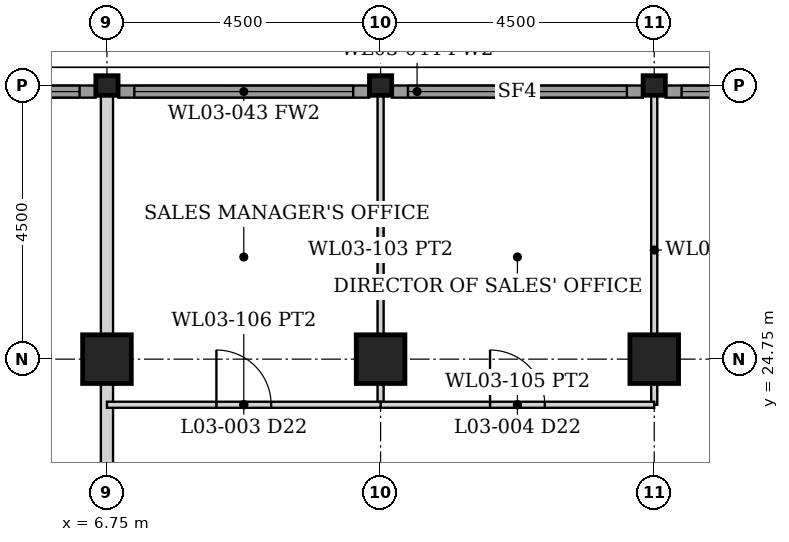
"""IFC4 building model, lengths in metres.
Left out: names, types, materials, properties, quantities, classifications, styles, units other than length and angle.
Written with IfcOpenShell. Run it as: python <this file> out.ifc"""

import sys

from ifc_helpers import new_model, si_unit, direction, frame, frame_2d, origin, origin_2d, place, context, subcontext, project, spatial, rectangle, hollow_rectangle, i_section, extrude, element, fill, save


model = new_model("IFC4")
c1 = context("Model", 3, precision=1e-05, world=origin(), true_north=direction((0.0, 1.0)))
c2 = subcontext(c1, "Body", "Model", "MODEL_VIEW")
j1 = project(units=[si_unit("LENGTHUNIT", "METRE"), si_unit("PLANEANGLEUNIT", "RADIAN")], contexts=[c1])
p1 = place(None, origin())
s1 = spatial("IfcSite", under=j1, at=p1, CompositionType="ELEMENT")
p2 = place(p1, origin())
s2 = spatial("IfcBuilding", under=s1, at=p2, CompositionType="ELEMENT")
p3 = place(p2, frame((0.0, 0.0, 16.0)))
s3 = spatial("IfcBuildingStorey", under=s2, at=p3, CompositionType="ELEMENT", Elevation=16.0)
for number, where, z_axis, x_axis in (
    (1, (6.75, 24.75, 0.0), (0.0, 0.0, 1.0), (0.0, 1.0, 0.0)),
    (2, (11.25, 24.75, 0.0), (0.0, 0.0, 1.0), (0.0, 1.0, 0.0)),
    (3, (15.75, 24.75, 0.0), (0.0, 0.0, 1.0), (0.0, 1.0, 0.0)),
):
    element("IfcColumn", number, at=place(p3, frame(where, z_axis=z_axis, x_axis=x_axis)), inside=s3, PredefinedType="COLUMN", context=c2, shape_type="SweptSolid", body=[
        extrude(hollow_rectangle(XDim=0.8, YDim=0.8, WallThickness=0.08, at=origin_2d()), origin(), (0.0, 0.0, 1.0), 5.5),
    ])
for number, where, z_axis, x_axis in (
    (4, (6.75, 29.25, 0.0), (0.0, 0.0, 1.0), (0.0, 1.0, 0.0)),
    (5, (11.25, 29.25, 0.0), (0.0, 0.0, 1.0), (0.0, 1.0, 0.0)),
    (6, (15.75, 29.25, 0.0), (0.0, 0.0, 1.0), (0.0, 1.0, 0.0)),
):
    element("IfcColumn", number, at=place(p3, frame(where, z_axis=z_axis, x_axis=x_axis)), inside=s3, PredefinedType="COLUMN", context=c2, shape_type="SweptSolid", body=[
        extrude(i_section(OverallWidth=0.322, OverallDepth=0.365, WebThickness=0.027, FlangeThickness=0.044, FilletRadius=0.015, at=origin_2d()), origin(), (0.0, 0.0, 1.0), 5.5),
    ])
p4 = place(p3, frame((2.438, 29.15, 0.0), z_axis=(0.0, 0.0, 1.0), x_axis=(1.0, 0.0, 0.0)))
e7 = element("IfcWall", 7, at=p4, inside=s3, PredefinedType="SOLIDWALL", context=c2, shape_type="SweptSolid", body=[
    extrude(rectangle(XDim=4.125, YDim=0.2, at=frame_2d((2.062, 0.0))), origin(), (0.0, 0.0, 1.0), 4.633),
])
p5 = place(p4, frame((0.262, 0.0, 0.15)))
e8 = element("IfcOpeningElement", 8, at=p5, cuts=e7, PredefinedType="OPENING", context=c2, shape_type="SweptSolid", body=[
    extrude(rectangle(XDim=3.6, YDim=4.333, at=frame_2d((1.8, 2.167))), frame((0.0, 0.11, 0.0), z_axis=(0.0, -1.0, 0.0), x_axis=(1.0, 0.0, 0.0)), (0.0, 0.0, 1.0), 0.22),
])
p6 = place(p3, frame((6.938, 29.15, 0.0), z_axis=(0.0, 0.0, 1.0), x_axis=(1.0, 0.0, 0.0)))
e9 = element("IfcWall", 9, at=p6, inside=s3, PredefinedType="SOLIDWALL", context=c2, shape_type="SweptSolid", body=[
    extrude(rectangle(XDim=4.125, YDim=0.2, at=frame_2d((2.062, 0.0))), origin(), (0.0, 0.0, 1.0), 4.633),
])
p7 = place(p6, frame((0.262, 0.0, 0.15)))
e10 = element("IfcOpeningElement", 10, at=p7, cuts=e9, PredefinedType="OPENING", context=c2, shape_type="SweptSolid", body=[
    extrude(rectangle(XDim=3.6, YDim=4.333, at=frame_2d((1.8, 2.167))), frame((0.0, 0.11, 0.0), z_axis=(0.0, -1.0, 0.0), x_axis=(1.0, 0.0, 0.0)), (0.0, 0.0, 1.0), 0.22),
])
p8 = place(p3, frame((11.438, 29.15, 0.0), z_axis=(0.0, 0.0, 1.0), x_axis=(1.0, 0.0, 0.0)))
e11 = element("IfcWall", 11, at=p8, inside=s3, PredefinedType="SOLIDWALL", context=c2, shape_type="SweptSolid", body=[
    extrude(rectangle(XDim=4.125, YDim=0.2, at=frame_2d((2.062, 0.0))), origin(), (0.0, 0.0, 1.0), 4.633),
])
p9 = place(p8, frame((0.262, 0.0, 0.15)))
e12 = element("IfcOpeningElement", 12, at=p9, cuts=e11, PredefinedType="OPENING", context=c2, shape_type="SweptSolid", body=[
    extrude(rectangle(XDim=3.6, YDim=4.333, at=frame_2d((1.8, 2.167))), frame((0.0, 0.11, 0.0), z_axis=(0.0, -1.0, 0.0), x_axis=(1.0, 0.0, 0.0)), (0.0, 0.0, 1.0), 0.22),
])
p10 = place(p3, frame((15.938, 29.15, 0.0), z_axis=(0.0, 0.0, 1.0), x_axis=(1.0, 0.0, 0.0)))
e13 = element("IfcWall", 13, at=p10, inside=s3, PredefinedType="SOLIDWALL", context=c2, shape_type="SweptSolid", body=[
    extrude(rectangle(XDim=4.125, YDim=0.2, at=frame_2d((2.062, 0.0))), origin(), (0.0, 0.0, 1.0), 4.633),
])
p11 = place(p10, frame((0.262, 0.0, 0.15)))
e14 = element("IfcOpeningElement", 14, at=p11, cuts=e13, PredefinedType="OPENING", context=c2, shape_type="SweptSolid", body=[
    extrude(rectangle(XDim=3.6, YDim=4.333, at=frame_2d((1.8, 2.167))), frame((0.0, 0.11, 0.0), z_axis=(0.0, -1.0, 0.0), x_axis=(1.0, 0.0, 0.0)), (0.0, 0.0, 1.0), 0.22),
])
p12 = place(p3, frame((6.75, 9.2, 0.0), z_axis=(0.0, 0.0, 1.0), x_axis=(0.0, 1.0, 0.0)))
e15 = element("IfcWall", 15, at=p12, inside=s3, PredefinedType="PARTITIONING", context=c2, shape_type="SweptSolid", body=[
    extrude(rectangle(XDim=19.889, YDim=0.2, at=frame_2d((9.944, 0.0))), origin(), (0.0, 0.0, 1.0), 4.329),
])
for number, where, z_axis, x_axis in (
    (16, (11.25, 24.0, 0.0), (0.0, 0.0, 1.0), (0.0, 1.0, 0.0)),
    (17, (15.75, 24.0, 0.0), (0.0, 0.0, 1.0), (0.0, 1.0, 0.0)),
):
    element("IfcWall", number, at=place(p3, frame(where, z_axis=z_axis, x_axis=x_axis)), inside=s3, PredefinedType="PARTITIONING", context=c2, shape_type="SweptSolid", body=[
        extrude(rectangle(XDim=5.089, YDim=0.1, at=frame_2d((2.544, 0.0))), origin(), (0.0, 0.0, 1.0), 4.329),
    ])
p13 = place(p3, frame((11.25, 24.0, 0.0), z_axis=(0.0, 0.0, 1.0), x_axis=(1.0, 0.0, 0.0)))
e18 = element("IfcWall", 18, at=p13, inside=s3, PredefinedType="PARTITIONING", context=c2, shape_type="SweptSolid", body=[
    extrude(rectangle(XDim=4.5, YDim=0.1, at=frame_2d((2.25, 0.0))), origin(), (0.0, 0.0, 1.0), 4.329),
])
p14 = place(p13, frame((1.8, 0.0, 0.0)))
e19 = element("IfcOpeningElement", 19, at=p14, cuts=e18, PredefinedType="OPENING", context=c2, shape_type="SweptSolid", body=[
    extrude(rectangle(XDim=0.9, YDim=2.1, at=frame_2d((0.45, 1.05))), frame((0.0, 0.06, 0.0), z_axis=(0.0, -1.0, 0.0), x_axis=(1.0, 0.0, 0.0)), (0.0, 0.0, 1.0), 0.12),
])
p15 = place(p3, frame((6.75, 24.0, 0.0), z_axis=(0.0, 0.0, 1.0), x_axis=(1.0, 0.0, 0.0)))
e20 = element("IfcWall", 20, at=p15, inside=s3, PredefinedType="PARTITIONING", context=c2, shape_type="SweptSolid", body=[
    extrude(rectangle(XDim=4.5, YDim=0.1, at=frame_2d((2.25, 0.0))), origin(), (0.0, 0.0, 1.0), 4.329),
])
p16 = place(p15, frame((1.8, 0.0, 0.0)))
e21 = element("IfcOpeningElement", 21, at=p16, cuts=e20, PredefinedType="OPENING", context=c2, shape_type="SweptSolid", body=[
    extrude(rectangle(XDim=0.9, YDim=2.1, at=frame_2d((0.45, 1.05))), frame((0.0, 0.06, 0.0), z_axis=(0.0, -1.0, 0.0), x_axis=(1.0, 0.0, 0.0)), (0.0, 0.0, 1.0), 0.12),
])
p17 = place(p5, origin())
e22 = element("IfcWindow", 22, at=p17, inside=s3, PartitioningType="SINGLE_PANEL", PredefinedType="WINDOW", context=c2, shape_type="SweptSolid", body=[
    extrude(rectangle(XDim=3.6, YDim=4.333, at=frame_2d((1.8, 2.167))), frame((0.0, 0.03, 0.0), z_axis=(0.0, -1.0, 0.0), x_axis=(1.0, 0.0, 0.0)), (0.0, 0.0, 1.0), 0.06),
])
fill(e8, e22)
p18 = place(p7, origin())
e23 = element("IfcWindow", 23, at=p18, inside=s3, PartitioningType="SINGLE_PANEL", PredefinedType="WINDOW", context=c2, shape_type="SweptSolid", body=[
    extrude(rectangle(XDim=3.6, YDim=4.333, at=frame_2d((1.8, 2.167))), frame((0.0, 0.03, 0.0), z_axis=(0.0, -1.0, 0.0), x_axis=(1.0, 0.0, 0.0)), (0.0, 0.0, 1.0), 0.06),
])
fill(e10, e23)
p19 = place(p9, origin())
e24 = element("IfcWindow", 24, at=p19, inside=s3, PartitioningType="SINGLE_PANEL", PredefinedType="WINDOW", context=c2, shape_type="SweptSolid", body=[
    extrude(rectangle(XDim=3.6, YDim=4.333, at=frame_2d((1.8, 2.167))), frame((0.0, 0.03, 0.0), z_axis=(0.0, -1.0, 0.0), x_axis=(1.0, 0.0, 0.0)), (0.0, 0.0, 1.0), 0.06),
])
fill(e12, e24)
p20 = place(p11, origin())
e25 = element("IfcWindow", 25, at=p20, inside=s3, PartitioningType="SINGLE_PANEL", PredefinedType="WINDOW", context=c2, shape_type="SweptSolid", body=[
    extrude(rectangle(XDim=3.6, YDim=4.333, at=frame_2d((1.8, 2.167))), frame((0.0, 0.03, 0.0), z_axis=(0.0, -1.0, 0.0), x_axis=(1.0, 0.0, 0.0)), (0.0, 0.0, 1.0), 0.06),
])
fill(e14, e25)
p21 = place(p14, origin())
e26 = element("IfcDoor", 26, at=p21, inside=s3, OperationType="SINGLE_SWING_LEFT", PredefinedType="DOOR", context=c2, shape_type="SweptSolid", body=[
    extrude(rectangle(XDim=0.9, YDim=2.1, at=frame_2d((0.45, 1.05))), frame((0.0, 0.025, 0.0), z_axis=(0.0, -1.0, 0.0), x_axis=(1.0, 0.0, 0.0)), (0.0, 0.0, 1.0), 0.05),
])
fill(e19, e26)
p22 = place(p16, origin())
e27 = element("IfcDoor", 27, at=p22, inside=s3, OperationType="SINGLE_SWING_LEFT", PredefinedType="DOOR", context=c2, shape_type="SweptSolid", body=[
    extrude(rectangle(XDim=0.9, YDim=2.1, at=frame_2d((0.45, 1.05))), frame((0.0, 0.025, 0.0), z_axis=(0.0, -1.0, 0.0), x_axis=(1.0, 0.0, 0.0)), (0.0, 0.0, 1.0), 0.05),
])
fill(e21, e27)
save(model, sys.argv[1])
